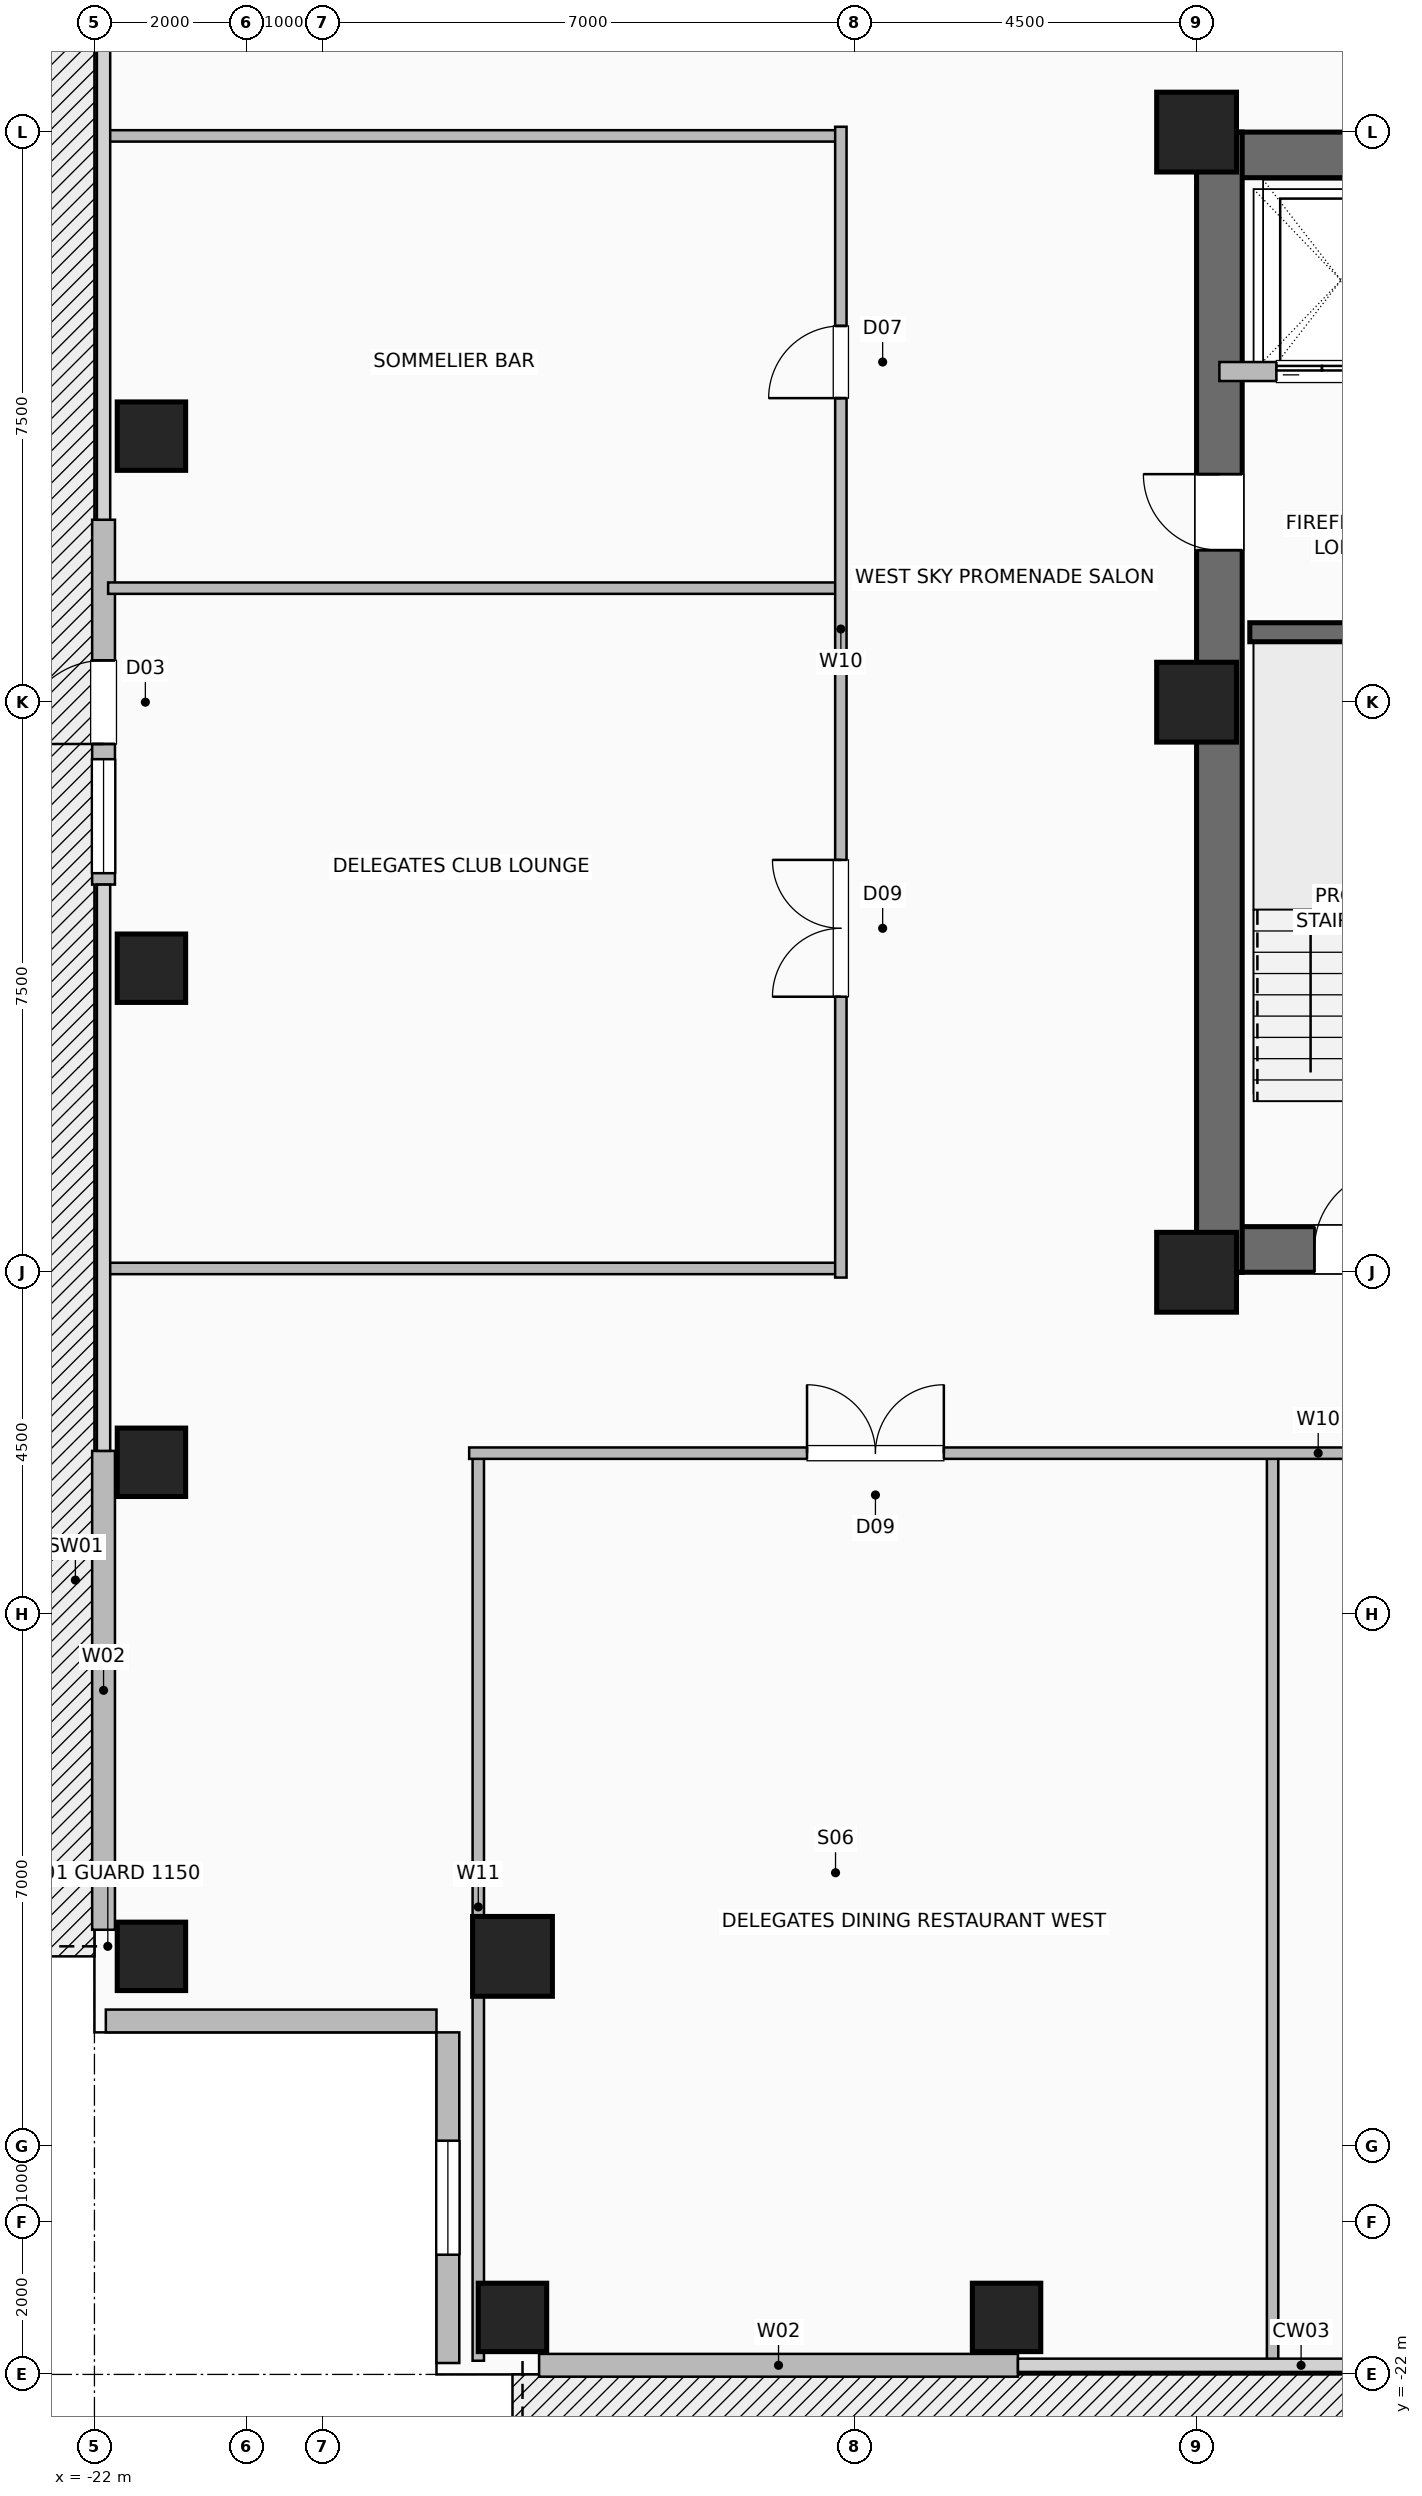
"""IFC4 building model, lengths in metres.
Left out: names, types, materials, properties, quantities, classifications, styles, units other than length and angle.
Written with IfcOpenShell. Run it as: python <this file> out.ifc"""

import sys

from ifc_helpers import new_model, si_unit, direction, frame, frame_2d, origin, origin_2d, place, context, subcontext, project, spatial, rectangle, hollow_rectangle, extrude, element, fill, save


model = new_model("IFC4")
c1 = context("Model", 3, precision=1e-05, world=origin(), true_north=direction((0.0, 1.0)))
c2 = subcontext(c1, "Body", "Model", "MODEL_VIEW")
j1 = project(units=[si_unit("LENGTHUNIT", "METRE"), si_unit("PLANEANGLEUNIT", "RADIAN")], contexts=[c1])
p1 = place(None, origin())
s1 = spatial("IfcSite", under=j1, at=p1, CompositionType="ELEMENT")
p2 = place(p1, origin())
s2 = spatial("IfcBuilding", under=s1, at=p2, CompositionType="ELEMENT")
p3 = place(p2, frame((0.0, 0.0, 122.8)))
s3 = spatial("IfcBuildingStorey", under=s2, at=p3, CompositionType="ELEMENT", Elevation=122.8)
for number, where, z_axis, x_axis in (
    (1, (-7.5, -7.5, 0.0), (0.0, 0.0, 1.0), (1.0, 0.0, 0.0)),
    (2, (-7.5, 7.5, 0.0), (0.0, 0.0, 1.0), (1.0, 0.0, 0.0)),
    (3, (-7.5, 0.0, 0.0), (0.0, 0.0, 1.0), (1.0, 0.0, 0.0)),
):
    element("IfcColumn", number, at=place(p3, frame(where, z_axis=z_axis, x_axis=x_axis)), inside=s3, PredefinedType="COLUMN", context=c2, shape_type="SweptSolid", body=[
        extrude(hollow_rectangle(XDim=1.05, YDim=1.05, WallThickness=0.05, at=origin_2d()), origin(), (0.0, 0.0, 1.0), 3.6),
    ])
for number, where, z_axis, x_axis in (
    (4, (-16.5, -21.25, 0.0), (0.0, 0.0, 1.0), (1.0, 0.0, 0.0)),
    (5, (-21.25, -16.5, 0.0), (0.0, 0.0, 1.0), (1.0, 0.0, 0.0)),
    (6, (-10.0, -21.25, 0.0), (0.0, 0.0, 1.0), (1.0, 0.0, 0.0)),
    (7, (-21.25, -10.0, 0.0), (0.0, 0.0, 1.0), (1.0, 0.0, 0.0)),
    (8, (-21.25, -3.5, 0.0), (0.0, 0.0, 1.0), (1.0, 0.0, 0.0)),
    (9, (-21.25, 3.5, 0.0), (0.0, 0.0, 1.0), (1.0, 0.0, 0.0)),
):
    element("IfcColumn", number, at=place(p3, frame(where, z_axis=z_axis, x_axis=x_axis)), inside=s3, PredefinedType="COLUMN", context=c2, shape_type="SweptSolid", body=[
        extrude(hollow_rectangle(XDim=0.9, YDim=0.9, WallThickness=0.045, at=origin_2d()), origin(), (0.0, 0.0, 1.0), 3.6),
    ])
p4 = place(p3, frame((-16.5, -16.5, 0.0), z_axis=(0.0, 0.0, 1.0), x_axis=(1.0, 0.0, 0.0)))
e10 = element("IfcColumn", 10, at=p4, inside=s3, PredefinedType="COLUMN", context=c2, shape_type="SweptSolid", body=[
    extrude(hollow_rectangle(XDim=1.05, YDim=1.05, WallThickness=0.05, at=origin_2d()), origin(), (0.0, 0.0, 1.0), 3.6),
])
for number, where, z_axis, x_axis in (
    (11, (-16.15, -21.88, 0.0), (0.0, 0.0, 1.0), (1.0, 0.0, 0.0)),
    (12, (-21.88, -16.15, 0.0), (0.0, 0.0, 1.0), (0.0, 1.0, 0.0)),
):
    element("IfcWall", number, at=place(p3, frame(where, z_axis=z_axis, x_axis=x_axis)), inside=s3, PredefinedType="SOLIDWALL", context=c2, shape_type="SweptSolid", body=[
        extrude(rectangle(XDim=6.3, YDim=0.3, at=frame_2d((3.15, 0.0))), origin(), (0.0, 0.0, 1.0), 3.36),
    ])
p5 = place(p3, frame((-21.88, -2.4, 0.0), z_axis=(0.0, 0.0, 1.0), x_axis=(0.0, 1.0, 0.0)))
e13 = element("IfcWall", 13, at=p5, inside=s3, PredefinedType="SOLIDWALL", context=c2, shape_type="SweptSolid", body=[
    extrude(rectangle(XDim=4.8, YDim=0.3, at=frame_2d((2.4, 0.0))), origin(), (0.0, 0.0, 1.0), 3.36),
])
p6 = place(p5, frame((1.85, 0.0, 0.0)))
e14 = element("IfcOpeningElement", 14, at=p6, cuts=e13, PredefinedType="OPENING", context=c2, shape_type="SweptSolid", body=[
    extrude(rectangle(XDim=1.1, YDim=2.2, at=frame_2d((0.55, 1.1))), frame((0.0, 0.16, 0.0), z_axis=(0.0, -1.0, 0.0), x_axis=(1.0, 0.0, 0.0)), (0.0, 0.0, 1.0), 0.32),
])
p7 = place(p5, frame((0.15, 0.0, 0.85)))
e15 = element("IfcOpeningElement", 15, at=p7, cuts=e13, PredefinedType="OPENING", context=c2, shape_type="SweptSolid", body=[
    extrude(rectangle(XDim=1.5, YDim=1.8, at=frame_2d((0.75, 0.9))), frame((0.0, 0.16, 0.0), z_axis=(0.0, -1.0, 0.0), x_axis=(1.0, 0.0, 0.0)), (0.0, 0.0, 1.0), 0.32),
])
p8 = place(p3, frame((-17.35, -21.85, 0.0), z_axis=(0.0, 0.0, 1.0), x_axis=(0.0, 1.0, 0.0)))
e16 = element("IfcWall", 16, at=p8, inside=s3, PredefinedType="SOLIDWALL", context=c2, shape_type="SweptSolid", body=[
    extrude(rectangle(XDim=4.35, YDim=0.3, at=frame_2d((2.175, 0.0))), origin(), (0.0, 0.0, 1.0), 3.36),
])
p9 = place(p8, frame((1.425, 0.0, 0.9)))
e17 = element("IfcOpeningElement", 17, at=p9, cuts=e16, PredefinedType="OPENING", context=c2, shape_type="SweptSolid", body=[
    extrude(rectangle(XDim=1.5, YDim=1.8, at=frame_2d((0.75, 0.9))), frame((0.0, 0.16, 0.0), z_axis=(0.0, -1.0, 0.0), x_axis=(1.0, 0.0, 0.0)), (0.0, 0.0, 1.0), 0.32),
])
p10 = place(p3, frame((-21.85, -17.35, 0.0), z_axis=(0.0, 0.0, 1.0), x_axis=(1.0, 0.0, 0.0)))
e18 = element("IfcWall", 18, at=p10, inside=s3, PredefinedType="SOLIDWALL", context=c2, shape_type="SweptSolid", body=[
    extrude(rectangle(XDim=4.35, YDim=0.3, at=frame_2d((2.175, 0.0))), origin(), (0.0, 0.0, 1.0), 3.36),
])
p11 = place(p3, frame((-7.5, -7.2, 0.0), z_axis=(0.0, 0.0, 1.0), x_axis=(1.0, 0.0, 0.0)))
e19 = element("IfcWall", 19, at=p11, inside=s3, PredefinedType="SHEAR", context=c2, shape_type="SweptSolid", body=[
    extrude(rectangle(XDim=15.0, YDim=0.6, at=frame_2d((7.5, 0.0))), origin(), (0.0, 0.0, 1.0), 3.36),
])
p12 = place(p11, frame((1.55, 0.0, 0.0)))
e20 = element("IfcOpeningElement", 20, at=p12, cuts=e19, PredefinedType="OPENING", context=c2, shape_type="SweptSolid", body=[
    extrude(rectangle(XDim=1.05, YDim=2.08, at=frame_2d((0.525, 1.04))), frame((0.0, 0.31, 0.0), z_axis=(0.0, -1.0, 0.0), x_axis=(1.0, 0.0, 0.0)), (0.0, 0.0, 1.0), 0.62),
])
p13 = place(p11, frame((12.4, 0.0, 0.0)))
e21 = element("IfcOpeningElement", 21, at=p13, cuts=e19, PredefinedType="OPENING", context=c2, shape_type="SweptSolid", body=[
    extrude(rectangle(XDim=1.05, YDim=2.08, at=frame_2d((0.525, 1.04))), frame((0.0, 0.31, 0.0), z_axis=(0.0, -1.0, 0.0), x_axis=(1.0, 0.0, 0.0)), (0.0, 0.0, 1.0), 0.62),
])
p14 = place(p11, frame((5.2, 0.0, 0.0)))
e22 = element("IfcOpeningElement", 22, at=p14, cuts=e19, PredefinedType="OPENING", context=c2, shape_type="SweptSolid", body=[
    extrude(rectangle(XDim=1.0, YDim=2.08, at=frame_2d((0.5, 1.04))), frame((0.0, 0.31, 0.0), z_axis=(0.0, -1.0, 0.0), x_axis=(1.0, 0.0, 0.0)), (0.0, 0.0, 1.0), 0.62),
])
p15 = place(p11, frame((8.65, 0.0, 0.0)))
e23 = element("IfcOpeningElement", 23, at=p15, cuts=e19, PredefinedType="OPENING", context=c2, shape_type="SweptSolid", body=[
    extrude(rectangle(XDim=1.0, YDim=2.08, at=frame_2d((0.5, 1.04))), frame((0.0, 0.31, 0.0), z_axis=(0.0, -1.0, 0.0), x_axis=(1.0, 0.0, 0.0)), (0.0, 0.0, 1.0), 0.62),
])
p16 = place(p3, frame((-7.5, 7.2, 0.0), z_axis=(0.0, 0.0, 1.0), x_axis=(1.0, 0.0, 0.0)))
e24 = element("IfcWall", 24, at=p16, inside=s3, PredefinedType="SHEAR", context=c2, shape_type="SweptSolid", body=[
    extrude(rectangle(XDim=15.0, YDim=0.6, at=frame_2d((7.5, 0.0))), origin(), (0.0, 0.0, 1.0), 3.36),
])
p17 = place(p3, frame((-7.2, -7.5, 0.0), z_axis=(0.0, 0.0, 1.0), x_axis=(0.0, 1.0, 0.0)))
e25 = element("IfcWall", 25, at=p17, inside=s3, PredefinedType="SHEAR", context=c2, shape_type="SweptSolid", body=[
    extrude(rectangle(XDim=15.0, YDim=0.6, at=frame_2d((7.5, 0.0))), origin(), (0.0, 0.0, 1.0), 3.36),
])
p18 = place(p17, frame((9.5, 0.0, 0.0)))
e26 = element("IfcOpeningElement", 26, at=p18, cuts=e25, PredefinedType="OPENING", context=c2, shape_type="SweptSolid", body=[
    extrude(rectangle(XDim=1.0, YDim=2.08, at=frame_2d((0.5, 1.04))), frame((0.0, 0.31, 0.0), z_axis=(0.0, -1.0, 0.0), x_axis=(1.0, 0.0, 0.0)), (0.0, 0.0, 1.0), 0.62),
])
p19 = place(p3, frame((-6.8, 0.92, 0.0), z_axis=(0.0, 0.0, 1.0), x_axis=(1.0, 0.0, 0.0)))
e27 = element("IfcWall", 27, at=p19, inside=s3, PredefinedType="SHEAR", context=c2, shape_type="SweptSolid", body=[
    extrude(rectangle(XDim=3.33, YDim=0.25, at=frame_2d((1.665, 0.0))), origin(), (0.0, 0.0, 1.0), 3.36),
])
p20 = place(p3, frame((-7.2, 4.35, 0.0), z_axis=(0.0, 0.0, 1.0), x_axis=(1.0, 0.0, 0.0)))
e28 = element("IfcWall", 28, at=p20, inside=s3, PredefinedType="SHEAR", context=c2, shape_type="SweptSolid", body=[
    extrude(rectangle(XDim=2.7, YDim=0.25, at=frame_2d((1.35, 0.0))), origin(), (0.0, 0.0, 1.0), 3.36),
])
p21 = place(p20, frame((0.75, 0.0, 0.0)))
e29 = element("IfcOpeningElement", 29, at=p21, cuts=e28, PredefinedType="OPENING", context=c2, shape_type="SweptSolid", body=[
    extrude(rectangle(XDim=1.2, YDim=2.2, at=frame_2d((0.6, 1.1))), frame((0.0, 0.135, 0.0), z_axis=(0.0, -1.0, 0.0), x_axis=(1.0, 0.0, 0.0)), (0.0, 0.0, 1.0), 0.27),
])
for number, where, z_axis, x_axis in (
    (30, (-16.95, -21.82, 0.0), (0.0, 0.0, 1.0), (0.0, 1.0, 0.0)),
    (31, (-6.5, -21.82, 0.0), (0.0, 0.0, 1.0), (0.0, 1.0, 0.0)),
):
    element("IfcWall", number, at=place(p3, frame(where, z_axis=z_axis, x_axis=x_axis)), inside=s3, PredefinedType="PARTITIONING", context=c2, shape_type="SweptSolid", body=[
        extrude(rectangle(XDim=11.94, YDim=0.15, at=frame_2d((5.97, 0.0))), origin(), (0.0, 0.0, 1.0), 3.36),
    ])
p22 = place(p3, frame((-17.07, -9.88, 0.0), z_axis=(0.0, 0.0, 1.0), x_axis=(1.0, 0.0, 0.0)))
e32 = element("IfcWall", 32, at=p22, inside=s3, PredefinedType="PARTITIONING", context=c2, shape_type="SweptSolid", body=[
    extrude(rectangle(XDim=34.14, YDim=0.15, at=frame_2d((17.07, 0.0))), origin(), (0.0, 0.0, 1.0), 3.36),
])
p23 = place(p22, frame((4.445, 0.0, 0.0)))
e33 = element("IfcOpeningElement", 33, at=p23, cuts=e32, PredefinedType="OPENING", context=c2, shape_type="SweptSolid", body=[
    extrude(rectangle(XDim=1.8, YDim=2.08, at=frame_2d((0.9, 1.04))), frame((0.0, 0.085, 0.0), z_axis=(0.0, -1.0, 0.0), x_axis=(1.0, 0.0, 0.0)), (0.0, 0.0, 1.0), 0.17),
])
p24 = place(p22, frame((16.095, 0.0, 0.0)))
e34 = element("IfcOpeningElement", 34, at=p24, cuts=e32, PredefinedType="OPENING", context=c2, shape_type="SweptSolid", body=[
    extrude(rectangle(XDim=0.95, YDim=2.06, at=frame_2d((0.475, 1.03))), frame((0.0, 0.085, 0.0), z_axis=(0.0, -1.0, 0.0), x_axis=(1.0, 0.0, 0.0)), (0.0, 0.0, 1.0), 0.17),
])
p25 = place(p22, frame((25.095, 0.0, 0.0)))
e35 = element("IfcOpeningElement", 35, at=p25, cuts=e32, PredefinedType="OPENING", context=c2, shape_type="SweptSolid", body=[
    extrude(rectangle(XDim=0.95, YDim=2.06, at=frame_2d((0.475, 1.03))), frame((0.0, 0.085, 0.0), z_axis=(0.0, -1.0, 0.0), x_axis=(1.0, 0.0, 0.0)), (0.0, 0.0, 1.0), 0.17),
])
p26 = place(p22, frame((30.82, 0.0, 0.0)))
e36 = element("IfcOpeningElement", 36, at=p26, cuts=e32, PredefinedType="OPENING", context=c2, shape_type="SweptSolid", body=[
    extrude(rectangle(XDim=0.95, YDim=2.06, at=frame_2d((0.475, 1.03))), frame((0.0, 0.085, 0.0), z_axis=(0.0, -1.0, 0.0), x_axis=(1.0, 0.0, 0.0)), (0.0, 0.0, 1.0), 0.17),
])
for number, where, z_axis, x_axis in (
    (37, (-21.82, -7.45, 0.0), (0.0, 0.0, 1.0), (1.0, 0.0, 0.0)),
    (38, (-21.82, 1.5, 0.0), (0.0, 0.0, 1.0), (1.0, 0.0, 0.0)),
    (39, (-21.82, 7.45, 0.0), (0.0, 0.0, 1.0), (1.0, 0.0, 0.0)),
):
    element("IfcWall", number, at=place(p3, frame(where, z_axis=z_axis, x_axis=x_axis)), inside=s3, PredefinedType="PARTITIONING", context=c2, shape_type="SweptSolid", body=[
        extrude(rectangle(XDim=9.64, YDim=0.15, at=frame_2d((4.82, 0.0))), origin(), (0.0, 0.0, 1.0), 3.36),
    ])
p27 = place(p3, frame((-12.18, -7.57, 0.0), z_axis=(0.0, 0.0, 1.0), x_axis=(0.0, 1.0, 0.0)))
e40 = element("IfcWall", 40, at=p27, inside=s3, PredefinedType="PARTITIONING", context=c2, shape_type="SweptSolid", body=[
    extrude(rectangle(XDim=15.14, YDim=0.15, at=frame_2d((7.57, 0.0))), origin(), (0.0, 0.0, 1.0), 3.36),
])
p28 = place(p27, frame((3.695, 0.0, 0.0)))
e41 = element("IfcOpeningElement", 41, at=p28, cuts=e40, PredefinedType="OPENING", context=c2, shape_type="SweptSolid", body=[
    extrude(rectangle(XDim=1.8, YDim=2.08, at=frame_2d((0.9, 1.04))), frame((0.0, 0.085, 0.0), z_axis=(0.0, -1.0, 0.0), x_axis=(1.0, 0.0, 0.0)), (0.0, 0.0, 1.0), 0.17),
])
p29 = place(p27, frame((11.57, 0.0, 0.0)))
e42 = element("IfcOpeningElement", 42, at=p29, cuts=e40, PredefinedType="OPENING", context=c2, shape_type="SweptSolid", body=[
    extrude(rectangle(XDim=0.95, YDim=2.06, at=frame_2d((0.475, 1.03))), frame((0.0, 0.085, 0.0), z_axis=(0.0, -1.0, 0.0), x_axis=(1.0, 0.0, 0.0)), (0.0, 0.0, 1.0), 0.17),
])
p30 = place(p6, origin())
e43 = element("IfcDoor", 43, at=p30, inside=s3, OperationType="SINGLE_SWING_LEFT", PredefinedType="DOOR", context=c2, shape_type="SweptSolid", body=[
    extrude(rectangle(XDim=1.1, YDim=2.2, at=frame_2d((0.55, 1.1))), frame((0.0, 0.025, 0.0), z_axis=(0.0, -1.0, 0.0), x_axis=(1.0, 0.0, 0.0)), (0.0, 0.0, 1.0), 0.05),
])
fill(e14, e43)
p31 = place(p7, origin())
e44 = element("IfcWindow", 44, at=p31, inside=s3, PartitioningType="SINGLE_PANEL", PredefinedType="WINDOW", context=c2, shape_type="SweptSolid", body=[
    extrude(rectangle(XDim=1.5, YDim=1.8, at=frame_2d((0.75, 0.9))), frame((0.0, 0.03, 0.0), z_axis=(0.0, -1.0, 0.0), x_axis=(1.0, 0.0, 0.0)), (0.0, 0.0, 1.0), 0.06),
])
fill(e15, e44)
p32 = place(p9, origin())
e45 = element("IfcWindow", 45, at=p32, inside=s3, PartitioningType="SINGLE_PANEL", PredefinedType="WINDOW", context=c2, shape_type="SweptSolid", body=[
    extrude(rectangle(XDim=1.5, YDim=1.8, at=frame_2d((0.75, 0.9))), frame((0.0, 0.03, 0.0), z_axis=(0.0, -1.0, 0.0), x_axis=(1.0, 0.0, 0.0)), (0.0, 0.0, 1.0), 0.06),
])
fill(e17, e45)
p33 = place(p12, origin())
e46 = element("IfcDoor", 46, at=p33, inside=s3, OperationType="SINGLE_SWING_RIGHT", PredefinedType="DOOR", context=c2, shape_type="SweptSolid", body=[
    extrude(rectangle(XDim=1.05, YDim=2.08, at=frame_2d((0.525, 1.04))), frame((0.0, 0.025, 0.0), z_axis=(0.0, -1.0, 0.0), x_axis=(1.0, 0.0, 0.0)), (0.0, 0.0, 1.0), 0.05),
])
fill(e20, e46)
p34 = place(p18, origin())
e47 = element("IfcDoor", 47, at=p34, inside=s3, OperationType="SINGLE_SWING_RIGHT", PredefinedType="DOOR", context=c2, shape_type="SweptSolid", body=[
    extrude(rectangle(XDim=1.0, YDim=2.08, at=frame_2d((0.5, 1.04))), frame((0.0, 0.025, 0.0), z_axis=(0.0, -1.0, 0.0), x_axis=(1.0, 0.0, 0.0)), (0.0, 0.0, 1.0), 0.05),
])
fill(e26, e47)
p35 = place(p21, origin())
e48 = element("IfcDoor", 48, at=p35, inside=s3, OperationType="DOUBLE_DOOR_SLIDING", PredefinedType="DOOR", context=c2, shape_type="SweptSolid", body=[
    extrude(rectangle(XDim=1.2, YDim=2.2, at=frame_2d((0.6, 1.1))), frame((0.0, 0.025, 0.0), z_axis=(0.0, -1.0, 0.0), x_axis=(1.0, 0.0, 0.0)), (0.0, 0.0, 1.0), 0.05),
])
fill(e29, e48)
p36 = place(p23, origin())
e49 = element("IfcDoor", 49, at=p36, inside=s3, OperationType="DOUBLE_DOOR_SINGLE_SWING", PredefinedType="DOOR", context=c2, shape_type="SweptSolid", body=[
    extrude(rectangle(XDim=1.8, YDim=2.08, at=frame_2d((0.9, 1.04))), frame((0.0, 0.025, 0.0), z_axis=(0.0, -1.0, 0.0), x_axis=(1.0, 0.0, 0.0)), (0.0, 0.0, 1.0), 0.05),
])
fill(e33, e49)
p37 = place(p28, origin())
e50 = element("IfcDoor", 50, at=p37, inside=s3, OperationType="DOUBLE_DOOR_SINGLE_SWING", PredefinedType="DOOR", context=c2, shape_type="SweptSolid", body=[
    extrude(rectangle(XDim=1.8, YDim=2.08, at=frame_2d((0.9, 1.04))), frame((0.0, 0.025, 0.0), z_axis=(0.0, -1.0, 0.0), x_axis=(1.0, 0.0, 0.0)), (0.0, 0.0, 1.0), 0.05),
])
fill(e41, e50)
p38 = place(p29, origin())
e51 = element("IfcDoor", 51, at=p38, inside=s3, OperationType="SINGLE_SWING_LEFT", PredefinedType="DOOR", context=c2, shape_type="SweptSolid", body=[
    extrude(rectangle(XDim=0.95, YDim=2.06, at=frame_2d((0.475, 1.03))), frame((0.0, 0.025, 0.0), z_axis=(0.0, -1.0, 0.0), x_axis=(1.0, 0.0, 0.0)), (0.0, 0.0, 1.0), 0.05),
])
fill(e42, e51)
save(model, sys.argv[1])
